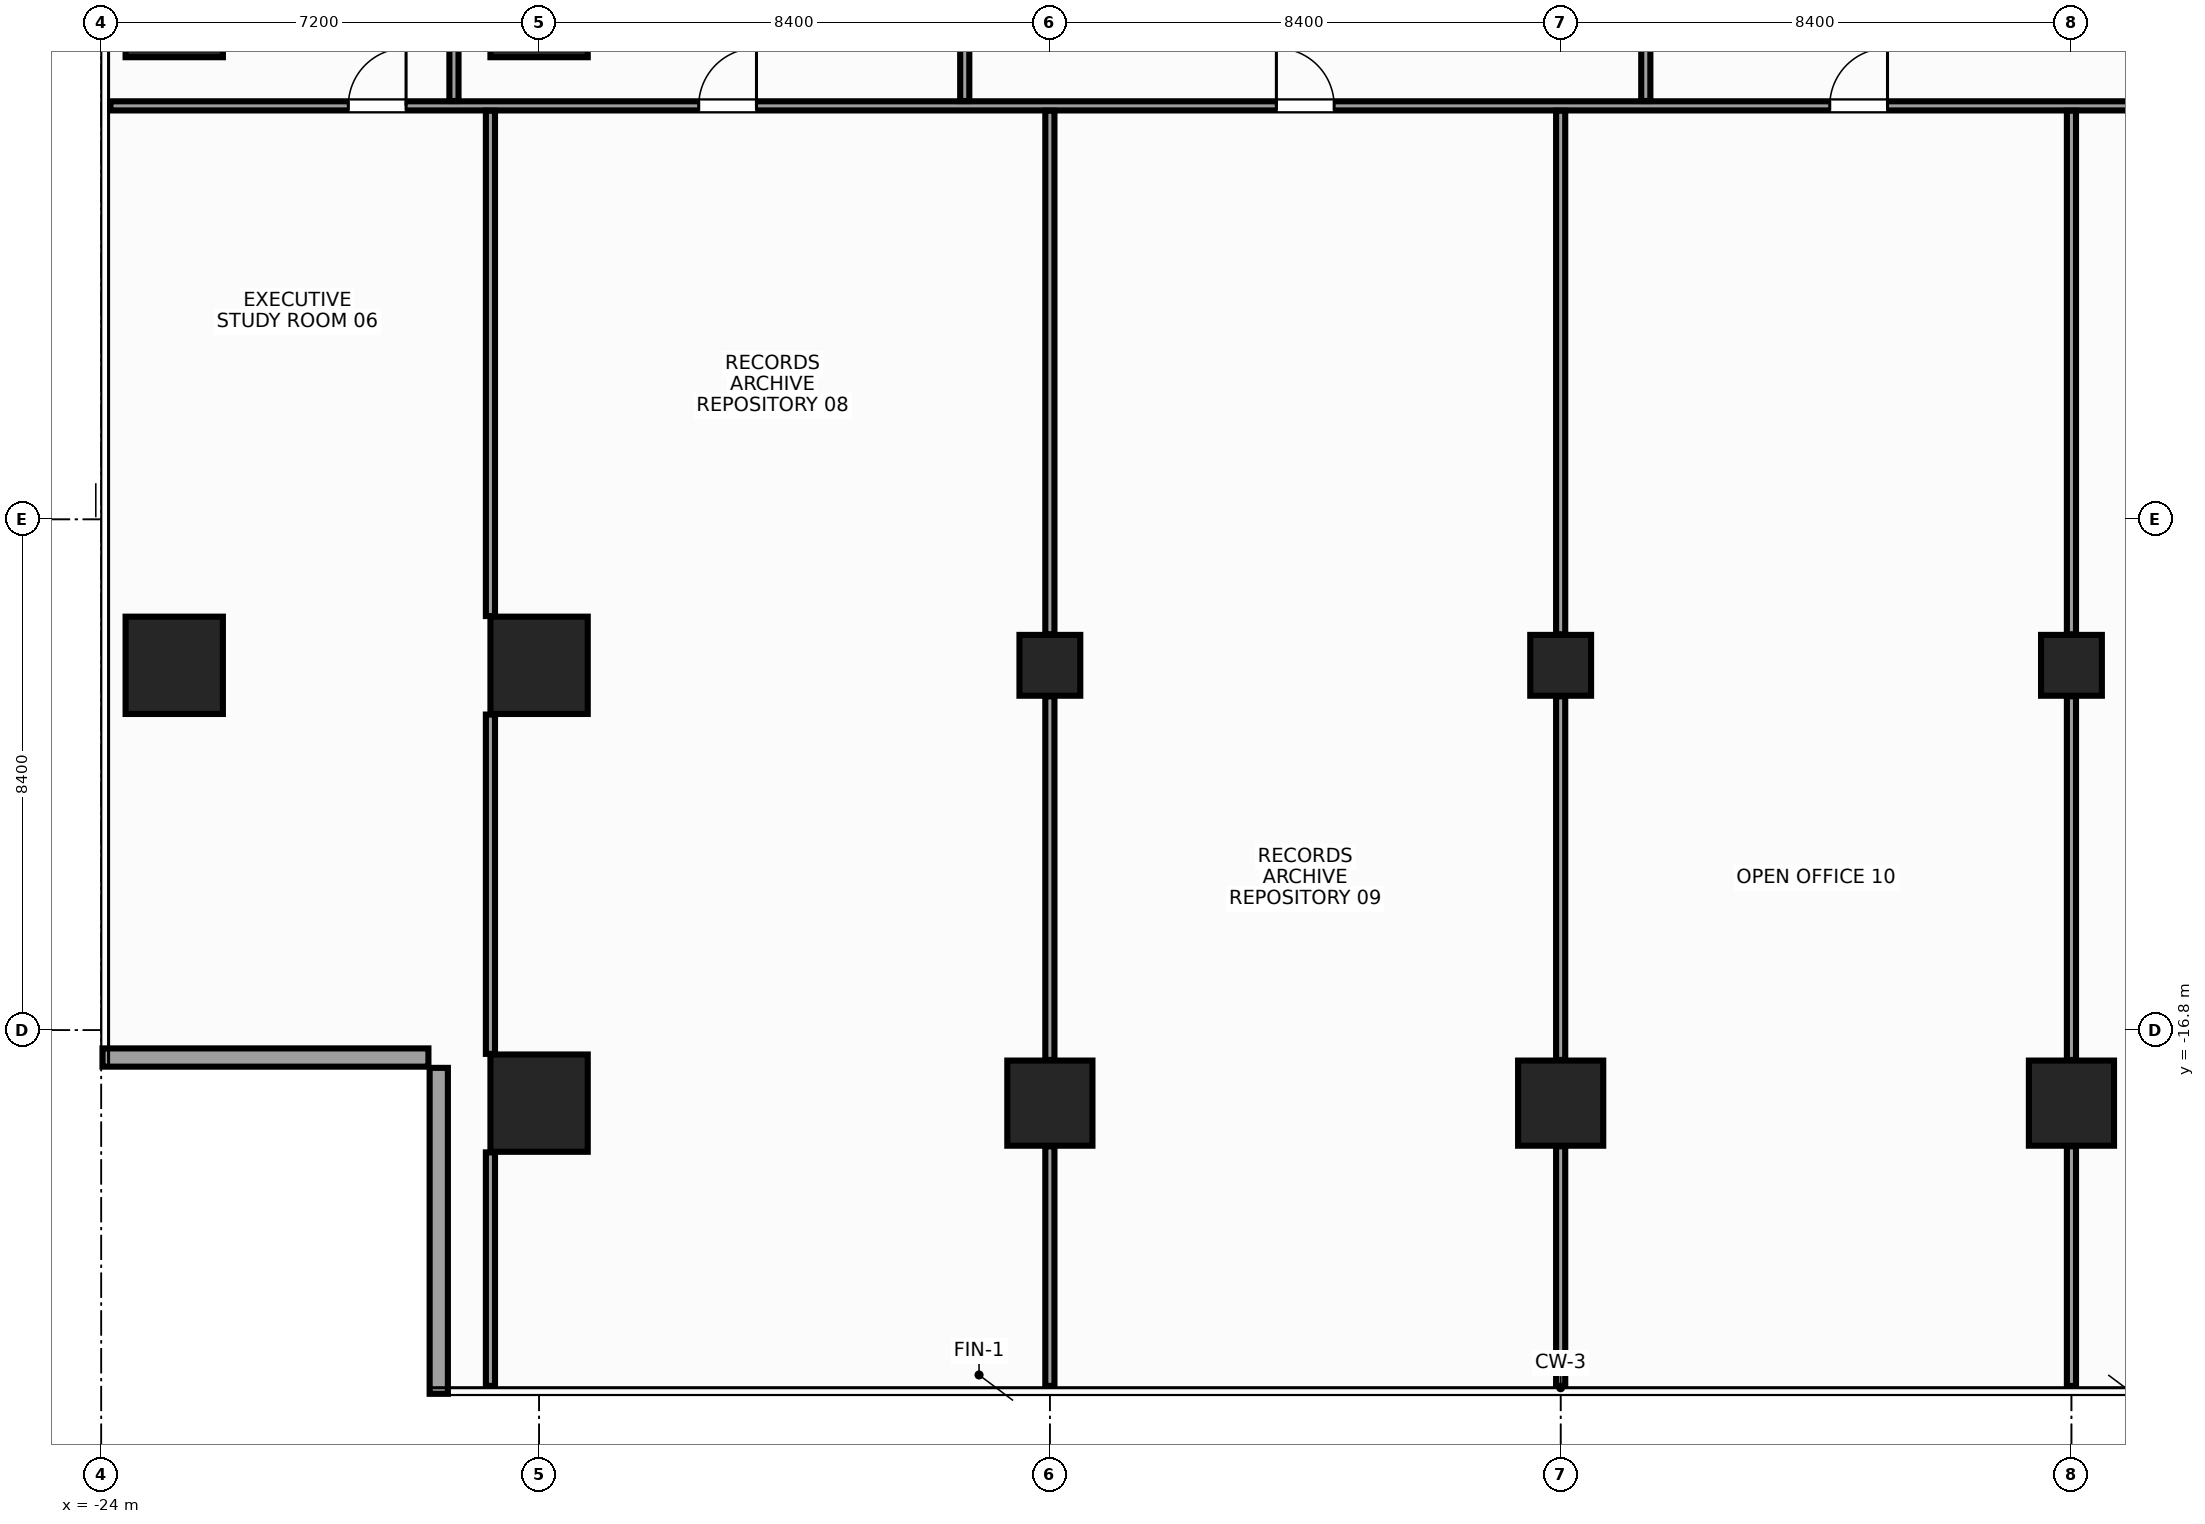
"""IFC4 building model, lengths in metres.
Left out: names, types, materials, properties, quantities, classifications, styles, units other than length and angle.
Written with IfcOpenShell. Run it as: python <this file> out.ifc"""

import sys

from ifc_helpers import new_model, si_unit, direction, frame, frame_2d, origin, origin_2d, place, context, subcontext, project, spatial, rectangle, hollow_rectangle, extrude, source, transform, mapped, element, fill, save


model = new_model("IFC4")
c1 = context("Model", 3, precision=1e-05, world=origin(), true_north=direction((0.0, 1.0)))
c2 = subcontext(c1, "Body", "Model", "MODEL_VIEW")
j1 = project(units=[si_unit("LENGTHUNIT", "METRE"), si_unit("PLANEANGLEUNIT", "RADIAN")], contexts=[c1])
p1 = place(None, origin())
s1 = spatial("IfcSite", under=j1, at=p1, CompositionType="ELEMENT")
p2 = place(p1, origin())
s2 = spatial("IfcBuilding", under=s1, at=p2, CompositionType="ELEMENT")
p3 = place(p2, frame((0.0, 0.0, 153.2)))
s3 = spatial("IfcBuildingStorey", under=s2, at=p3, CompositionType="ELEMENT", Elevation=153.2)
m1 = source(origin(), c2, "Body", "SweptSolid", [
    extrude(rectangle(XDim=1.6, YDim=1.6, at=origin_2d()), origin(), (0.0, 0.0, 1.0), 3.6),
])
for number, where, z_axis, x_axis in (
    (1, (-16.8, -18.0, 0.0), (0.0, 0.0, 1.0), (1.0, 0.0, 0.0)),
    (2, (-16.8, -10.8, 0.0), (0.0, 0.0, 1.0), (1.0, 0.0, 0.0)),
    (3, (-16.8, 0.0, 0.0), (0.0, 0.0, 1.0), (1.0, 0.0, 0.0)),
    (4, (-22.8, -10.8, 0.0), (0.0, 0.0, 1.0), (1.0, 0.0, 0.0)),
    (5, (-22.8, 0.0, 0.0), (0.0, 0.0, 1.0), (1.0, 0.0, 0.0)),
):
    element("IfcColumn", number, at=place(p3, frame(where, z_axis=z_axis, x_axis=x_axis)), inside=s3, PredefinedType="COLUMN", context=c2, shape_type="MappedRepresentation", body=[
        mapped(m1, transform((0.0, 0.0, 0.0), x_axis=(1.0, 0.0, 0.0), y_axis=(0.0, 1.0, 0.0), z_axis=(0.0, 0.0, 1.0), scale=1.0)),
    ])
m2 = source(origin(), c2, "Body", "SweptSolid", [
    extrude(rectangle(XDim=1.4, YDim=1.4, at=origin_2d()), origin(), (0.0, 0.0, 1.0), 3.6),
])
p4 = place(p3, frame((-8.4, -18.0, 0.0), z_axis=(0.0, 0.0, 1.0), x_axis=(1.0, 0.0, 0.0)))
e6 = element("IfcColumn", 6, at=p4, inside=s3, PredefinedType="COLUMN", context=c2, shape_type="MappedRepresentation", body=[
    mapped(m2, transform((0.0, 0.0, 0.0), x_axis=(1.0, 0.0, 0.0), y_axis=(0.0, 1.0, 0.0), z_axis=(0.0, 0.0, 1.0), scale=1.0)),
])
m3 = source(origin(), c2, "Body", "SweptSolid", [
    extrude(hollow_rectangle(XDim=1.0, YDim=1.0, WallThickness=0.045, at=origin_2d()), origin(), (0.0, 0.0, 1.0), 3.6),
])
p5 = place(p3, frame((-8.4, -10.8, 0.0), z_axis=(0.0, 0.0, 1.0), x_axis=(1.0, 0.0, 0.0)))
e7 = element("IfcColumn", 7, at=p5, inside=s3, PredefinedType="COLUMN", context=c2, shape_type="MappedRepresentation", body=[
    mapped(m3, transform((0.0, 0.0, 0.0), x_axis=(1.0, 0.0, 0.0), y_axis=(0.0, 1.0, 0.0), z_axis=(0.0, 0.0, 1.0), scale=1.0)),
])
p6 = place(p3, frame((8.4, -18.0, 0.0), z_axis=(0.0, 0.0, 1.0), x_axis=(1.0, 0.0, 0.0)))
e8 = element("IfcColumn", 8, at=p6, inside=s3, PredefinedType="COLUMN", context=c2, shape_type="MappedRepresentation", body=[
    mapped(m2, transform((0.0, 0.0, 0.0), x_axis=(1.0, 0.0, 0.0), y_axis=(0.0, 1.0, 0.0), z_axis=(0.0, 0.0, 1.0), scale=1.0)),
])
p7 = place(p3, frame((8.4, -10.8, 0.0), z_axis=(0.0, 0.0, 1.0), x_axis=(1.0, 0.0, 0.0)))
e9 = element("IfcColumn", 9, at=p7, inside=s3, PredefinedType="COLUMN", context=c2, shape_type="MappedRepresentation", body=[
    mapped(m3, transform((0.0, 0.0, 0.0), x_axis=(1.0, 0.0, 0.0), y_axis=(0.0, 1.0, 0.0), z_axis=(0.0, 0.0, 1.0), scale=1.0)),
])
p8 = place(p3, frame((0.0, -18.0, 0.0), z_axis=(0.0, 0.0, 1.0), x_axis=(1.0, 0.0, 0.0)))
e10 = element("IfcColumn", 10, at=p8, inside=s3, PredefinedType="COLUMN", context=c2, shape_type="MappedRepresentation", body=[
    mapped(m2, transform((0.0, 0.0, 0.0), x_axis=(1.0, 0.0, 0.0), y_axis=(0.0, 1.0, 0.0), z_axis=(0.0, 0.0, 1.0), scale=1.0)),
])
m4 = source(origin(), c2, "Body", "SweptSolid", [
    extrude(rectangle(XDim=1.0, YDim=1.0, at=origin_2d()), origin(), (0.0, 0.0, 1.0), 3.6),
])
p9 = place(p3, frame((0.0, -10.8, 0.0), z_axis=(0.0, 0.0, 1.0), x_axis=(1.0, 0.0, 0.0)))
e11 = element("IfcColumn", 11, at=p9, inside=s3, PredefinedType="COLUMN", context=c2, shape_type="MappedRepresentation", body=[
    mapped(m4, transform((0.0, 0.0, 0.0), x_axis=(1.0, 0.0, 0.0), y_axis=(0.0, 1.0, 0.0), z_axis=(0.0, 0.0, 1.0), scale=1.0)),
])
m5 = source(origin(), c2, "Body", "SweptSolid", [
    extrude(rectangle(XDim=5.36, YDim=0.3, at=frame_2d((2.68, 0.0))), origin(), (0.0, 0.0, 1.0), 2.76),
])
p10 = place(p3, frame((-23.98, -17.25, 0.0), z_axis=(0.0, 0.0, 1.0), x_axis=(1.0, 0.0, 0.0)))
e12 = element("IfcWall", 12, at=p10, inside=s3, PredefinedType="STANDARD", context=c2, shape_type="MappedRepresentation", body=[
    mapped(m5, transform((0.0, 0.0, 0.0), x_axis=(1.0, 0.0, 0.0), y_axis=(0.0, 1.0, 0.0), z_axis=(0.0, 0.0, 1.0), scale=1.0)),
])
m6 = source(origin(), c2, "Body", "SweptSolid", [
    extrude(rectangle(XDim=5.36, YDim=0.3, at=frame_2d((2.68, 0.0))), origin(), (0.0, 0.0, 1.0), 2.76),
])
p11 = place(p3, frame((-18.45, -17.42, 0.0), z_axis=(0.0, 0.0, 1.0), x_axis=(0.0, -1.0, 0.0)))
e13 = element("IfcWall", 13, at=p11, inside=s3, PredefinedType="STANDARD", context=c2, shape_type="MappedRepresentation", body=[
    mapped(m6, transform((0.0, 0.0, 0.0), x_axis=(1.0, 0.0, 0.0), y_axis=(0.0, 1.0, 0.0), z_axis=(0.0, 0.0, 1.0), scale=1.0)),
])
m7 = source(origin(), c2, "Body", "SweptSolid", [
    extrude(rectangle(XDim=34.895, YDim=0.15, at=frame_2d((17.448, 0.0))), origin(), (0.0, 0.0, 1.0), 2.765),
])
p12 = place(p3, frame((-23.85, -1.6, 0.0), z_axis=(0.0, 0.0, 1.0), x_axis=(1.0, 0.0, 0.0)))
e14 = element("IfcWall", 14, at=p12, inside=s3, PredefinedType="PARTITIONING", context=c2, shape_type="MappedRepresentation", body=[
    mapped(m7, transform((0.0, 0.0, 0.0), x_axis=(1.0, 0.0, 0.0), y_axis=(0.0, 1.0, 0.0), z_axis=(0.0, 0.0, 1.0), scale=1.0)),
])
p13 = place(p12, frame((3.913, 0.0, 0.0)))
e15 = element("IfcOpeningElement", 15, at=p13, cuts=e14, PredefinedType="OPENING", context=c2, shape_type="SweptSolid", body=[
    extrude(rectangle(XDim=0.95, YDim=2.15, at=frame_2d((0.475, 1.075))), frame((0.0, 0.087, 0.0), z_axis=(0.0, -1.0, 0.0), x_axis=(1.0, 0.0, 0.0)), (0.0, 0.0, 1.0), 0.174),
])
p14 = place(p12, frame((9.675, 0.0, 0.0)))
e16 = element("IfcOpeningElement", 16, at=p14, cuts=e14, PredefinedType="OPENING", context=c2, shape_type="SweptSolid", body=[
    extrude(rectangle(XDim=0.95, YDim=2.15, at=frame_2d((0.475, 1.075))), frame((0.0, 0.087, 0.0), z_axis=(0.0, -1.0, 0.0), x_axis=(1.0, 0.0, 0.0)), (0.0, 0.0, 1.0), 0.174),
])
p15 = place(p12, frame((19.175, 0.0, 0.0)))
e17 = element("IfcOpeningElement", 17, at=p15, cuts=e14, PredefinedType="OPENING", context=c2, shape_type="SweptSolid", body=[
    extrude(rectangle(XDim=0.95, YDim=2.15, at=frame_2d((0.475, 1.075))), frame((0.0, 0.087, 0.0), z_axis=(0.0, -1.0, 0.0), x_axis=(1.0, 0.0, 0.0)), (0.0, 0.0, 1.0), 0.174),
])
p16 = place(p12, frame((28.275, 0.0, 0.0)))
e18 = element("IfcOpeningElement", 18, at=p16, cuts=e14, PredefinedType="OPENING", context=c2, shape_type="SweptSolid", body=[
    extrude(rectangle(XDim=0.95, YDim=2.15, at=frame_2d((0.475, 1.075))), frame((0.0, 0.087, 0.0), z_axis=(0.0, -1.0, 0.0), x_axis=(1.0, 0.0, 0.0)), (0.0, 0.0, 1.0), 0.174),
])
m8 = source(origin(), c2, "Body", "SweptSolid", [
    extrude(rectangle(XDim=9.165, YDim=0.15, at=frame_2d((4.583, 0.0))), origin(), (0.0, 0.0, 1.0), 2.915),
])
p17 = place(p3, frame((-18.2, -1.52, 0.0), z_axis=(0.0, 0.0, 1.0), x_axis=(0.0, 1.0, 0.0)))
e19 = element("IfcWall", 19, at=p17, inside=s3, PredefinedType="PARTITIONING", context=c2, shape_type="MappedRepresentation", body=[
    mapped(m8, transform((0.0, 0.0, 0.0), x_axis=(1.0, 0.0, 0.0), y_axis=(0.0, 1.0, 0.0), z_axis=(0.0, 0.0, 1.0), scale=1.0)),
])
m9 = source(origin(), c2, "Body", "SweptSolid", [
    extrude(rectangle(XDim=9.165, YDim=0.15, at=frame_2d((4.583, 0.0))), origin(), (0.0, 0.0, 1.0), 2.665),
])
for number, where, z_axis, x_axis in (
    (20, (-9.8, -1.52, 0.0), (0.0, 0.0, 1.0), (0.0, 1.0, 0.0)),
    (21, (1.4, -1.52, 0.0), (0.0, 0.0, 1.0), (0.0, 1.0, 0.0)),
):
    element("IfcWall", number, at=place(p3, frame(where, z_axis=z_axis, x_axis=x_axis)), inside=s3, PredefinedType="PARTITIONING", context=c2, shape_type="MappedRepresentation", body=[
        mapped(m9, transform((0.0, 0.0, 0.0), x_axis=(1.0, 0.0, 0.0), y_axis=(0.0, 1.0, 0.0), z_axis=(0.0, 0.0, 1.0), scale=1.0)),
    ])
m10 = source(origin(), c2, "Body", "SweptSolid", [
    extrude(rectangle(XDim=3.84, YDim=0.15, at=frame_2d((1.92, 0.0))), origin(), (0.0, 0.0, 1.0), 3.38),
])
p18 = place(p3, frame((-17.6, -22.65, 0.0), z_axis=(0.0, 0.0, 1.0), x_axis=(0.0, 1.0, 0.0)))
e22 = element("IfcWall", 22, at=p18, inside=s3, PredefinedType="PARTITIONING", context=c2, shape_type="MappedRepresentation", body=[
    mapped(m10, transform((0.0, 0.0, 0.0), x_axis=(1.0, 0.0, 0.0), y_axis=(0.0, 1.0, 0.0), z_axis=(0.0, 0.0, 1.0), scale=1.0)),
])
m11 = source(origin(), c2, "Body", "SweptSolid", [
    extrude(rectangle(XDim=5.58, YDim=0.15, at=frame_2d((2.79, 0.0))), origin(), (0.0, 0.0, 1.0), 3.38),
])
p19 = place(p3, frame((-17.6, -17.19, 0.0), z_axis=(0.0, 0.0, 1.0), x_axis=(0.0, 1.0, 0.0)))
e23 = element("IfcWall", 23, at=p19, inside=s3, PredefinedType="PARTITIONING", context=c2, shape_type="MappedRepresentation", body=[
    mapped(m11, transform((0.0, 0.0, 0.0), x_axis=(1.0, 0.0, 0.0), y_axis=(0.0, 1.0, 0.0), z_axis=(0.0, 0.0, 1.0), scale=1.0)),
])
m12 = source(origin(), c2, "Body", "SweptSolid", [
    extrude(rectangle(XDim=8.31, YDim=0.15, at=frame_2d((4.155, 0.0))), origin(), (0.0, 0.0, 1.0), 3.38),
])
p20 = place(p3, frame((-17.6, -9.99, 0.0), z_axis=(0.0, 0.0, 1.0), x_axis=(0.0, 1.0, 0.0)))
e24 = element("IfcWall", 24, at=p20, inside=s3, PredefinedType="PARTITIONING", context=c2, shape_type="MappedRepresentation", body=[
    mapped(m12, transform((0.0, 0.0, 0.0), x_axis=(1.0, 0.0, 0.0), y_axis=(0.0, 1.0, 0.0), z_axis=(0.0, 0.0, 1.0), scale=1.0)),
])
m13 = source(origin(), c2, "Body", "SweptSolid", [
    extrude(rectangle(XDim=3.94, YDim=0.15, at=frame_2d((1.97, 0.0))), origin(), (0.0, 0.0, 1.0), 3.38),
])
p21 = place(p3, frame((-8.4, -22.65, 0.0), z_axis=(0.0, 0.0, 1.0), x_axis=(0.0, 1.0, 0.0)))
e25 = element("IfcWall", 25, at=p21, inside=s3, PredefinedType="PARTITIONING", context=c2, shape_type="MappedRepresentation", body=[
    mapped(m13, transform((0.0, 0.0, 0.0), x_axis=(1.0, 0.0, 0.0), y_axis=(0.0, 1.0, 0.0), z_axis=(0.0, 0.0, 1.0), scale=1.0)),
])
m14 = source(origin(), c2, "Body", "SweptSolid", [
    extrude(rectangle(XDim=5.98, YDim=0.15, at=frame_2d((2.99, 0.0))), origin(), (0.0, 0.0, 1.0), 2.965),
])
p22 = place(p3, frame((-8.4, -17.29, 0.0), z_axis=(0.0, 0.0, 1.0), x_axis=(0.0, 1.0, 0.0)))
e26 = element("IfcWall", 26, at=p22, inside=s3, PredefinedType="PARTITIONING", context=c2, shape_type="MappedRepresentation", body=[
    mapped(m14, transform((0.0, 0.0, 0.0), x_axis=(1.0, 0.0, 0.0), y_axis=(0.0, 1.0, 0.0), z_axis=(0.0, 0.0, 1.0), scale=1.0)),
])
m15 = source(origin(), c2, "Body", "SweptSolid", [
    extrude(rectangle(XDim=8.61, YDim=0.15, at=frame_2d((4.305, 0.0))), origin(), (0.0, 0.0, 1.0), 2.765),
])
p23 = place(p3, frame((-8.4, -10.29, 0.0), z_axis=(0.0, 0.0, 1.0), x_axis=(0.0, 1.0, 0.0)))
e27 = element("IfcWall", 27, at=p23, inside=s3, PredefinedType="PARTITIONING", context=c2, shape_type="MappedRepresentation", body=[
    mapped(m15, transform((0.0, 0.0, 0.0), x_axis=(1.0, 0.0, 0.0), y_axis=(0.0, 1.0, 0.0), z_axis=(0.0, 0.0, 1.0), scale=1.0)),
])
p24 = place(p3, frame((0.0, -22.65, 0.0), z_axis=(0.0, 0.0, 1.0), x_axis=(0.0, 1.0, 0.0)))
e28 = element("IfcWall", 28, at=p24, inside=s3, PredefinedType="PARTITIONING", context=c2, shape_type="MappedRepresentation", body=[
    mapped(m13, transform((0.0, 0.0, 0.0), x_axis=(1.0, 0.0, 0.0), y_axis=(0.0, 1.0, 0.0), z_axis=(0.0, 0.0, 1.0), scale=1.0)),
])
p25 = place(p3, frame((0.0, -17.29, 0.0), z_axis=(0.0, 0.0, 1.0), x_axis=(0.0, 1.0, 0.0)))
e29 = element("IfcWall", 29, at=p25, inside=s3, PredefinedType="PARTITIONING", context=c2, shape_type="MappedRepresentation", body=[
    mapped(m14, transform((0.0, 0.0, 0.0), x_axis=(1.0, 0.0, 0.0), y_axis=(0.0, 1.0, 0.0), z_axis=(0.0, 0.0, 1.0), scale=1.0)),
])
p26 = place(p3, frame((0.0, -10.29, 0.0), z_axis=(0.0, 0.0, 1.0), x_axis=(0.0, 1.0, 0.0)))
e30 = element("IfcWall", 30, at=p26, inside=s3, PredefinedType="PARTITIONING", context=c2, shape_type="MappedRepresentation", body=[
    mapped(m15, transform((0.0, 0.0, 0.0), x_axis=(1.0, 0.0, 0.0), y_axis=(0.0, 1.0, 0.0), z_axis=(0.0, 0.0, 1.0), scale=1.0)),
])
p27 = place(p3, frame((8.4, -22.65, 0.0), z_axis=(0.0, 0.0, 1.0), x_axis=(0.0, 1.0, 0.0)))
e31 = element("IfcWall", 31, at=p27, inside=s3, PredefinedType="PARTITIONING", context=c2, shape_type="MappedRepresentation", body=[
    mapped(m13, transform((0.0, 0.0, 0.0), x_axis=(1.0, 0.0, 0.0), y_axis=(0.0, 1.0, 0.0), z_axis=(0.0, 0.0, 1.0), scale=1.0)),
])
p28 = place(p3, frame((8.4, -17.29, 0.0), z_axis=(0.0, 0.0, 1.0), x_axis=(0.0, 1.0, 0.0)))
e32 = element("IfcWall", 32, at=p28, inside=s3, PredefinedType="PARTITIONING", context=c2, shape_type="MappedRepresentation", body=[
    mapped(m14, transform((0.0, 0.0, 0.0), x_axis=(1.0, 0.0, 0.0), y_axis=(0.0, 1.0, 0.0), z_axis=(0.0, 0.0, 1.0), scale=1.0)),
])
p29 = place(p3, frame((8.4, -10.29, 0.0), z_axis=(0.0, 0.0, 1.0), x_axis=(0.0, 1.0, 0.0)))
e33 = element("IfcWall", 33, at=p29, inside=s3, PredefinedType="PARTITIONING", context=c2, shape_type="MappedRepresentation", body=[
    mapped(m15, transform((0.0, 0.0, 0.0), x_axis=(1.0, 0.0, 0.0), y_axis=(0.0, 1.0, 0.0), z_axis=(0.0, 0.0, 1.0), scale=1.0)),
])
m16 = source(origin(), c2, "Body", "SweptSolid", [
    extrude(rectangle(XDim=0.95, YDim=2.15, at=frame_2d((0.475, 1.075))), frame((0.0, 0.025, 0.0), z_axis=(0.0, -1.0, 0.0), x_axis=(1.0, 0.0, 0.0)), (0.0, 0.0, 1.0), 0.05),
])
p30 = place(p13, origin())
e34 = element("IfcDoor", 34, at=p30, inside=s3, OperationType="SINGLE_SWING_RIGHT", PredefinedType="DOOR", context=c2, shape_type="MappedRepresentation", body=[
    mapped(m16, transform((0.0, 0.0, 0.0), x_axis=(1.0, 0.0, 0.0), y_axis=(0.0, 1.0, 0.0), z_axis=(0.0, 0.0, 1.0), scale=1.0)),
])
fill(e15, e34)
p31 = place(p14, origin())
e35 = element("IfcDoor", 35, at=p31, inside=s3, OperationType="SINGLE_SWING_RIGHT", PredefinedType="DOOR", context=c2, shape_type="MappedRepresentation", body=[
    mapped(m16, transform((0.0, 0.0, 0.0), x_axis=(1.0, 0.0, 0.0), y_axis=(0.0, 1.0, 0.0), z_axis=(0.0, 0.0, 1.0), scale=1.0)),
])
fill(e16, e35)
p32 = place(p15, origin())
e36 = element("IfcDoor", 36, at=p32, inside=s3, OperationType="SINGLE_SWING_LEFT", PredefinedType="DOOR", context=c2, shape_type="MappedRepresentation", body=[
    mapped(m16, transform((0.0, 0.0, 0.0), x_axis=(1.0, 0.0, 0.0), y_axis=(0.0, 1.0, 0.0), z_axis=(0.0, 0.0, 1.0), scale=1.0)),
])
fill(e17, e36)
p33 = place(p16, origin())
e37 = element("IfcDoor", 37, at=p33, inside=s3, OperationType="SINGLE_SWING_RIGHT", PredefinedType="DOOR", context=c2, shape_type="MappedRepresentation", body=[
    mapped(m16, transform((0.0, 0.0, 0.0), x_axis=(1.0, 0.0, 0.0), y_axis=(0.0, 1.0, 0.0), z_axis=(0.0, 0.0, 1.0), scale=1.0)),
])
fill(e18, e37)
save(model, sys.argv[1])
